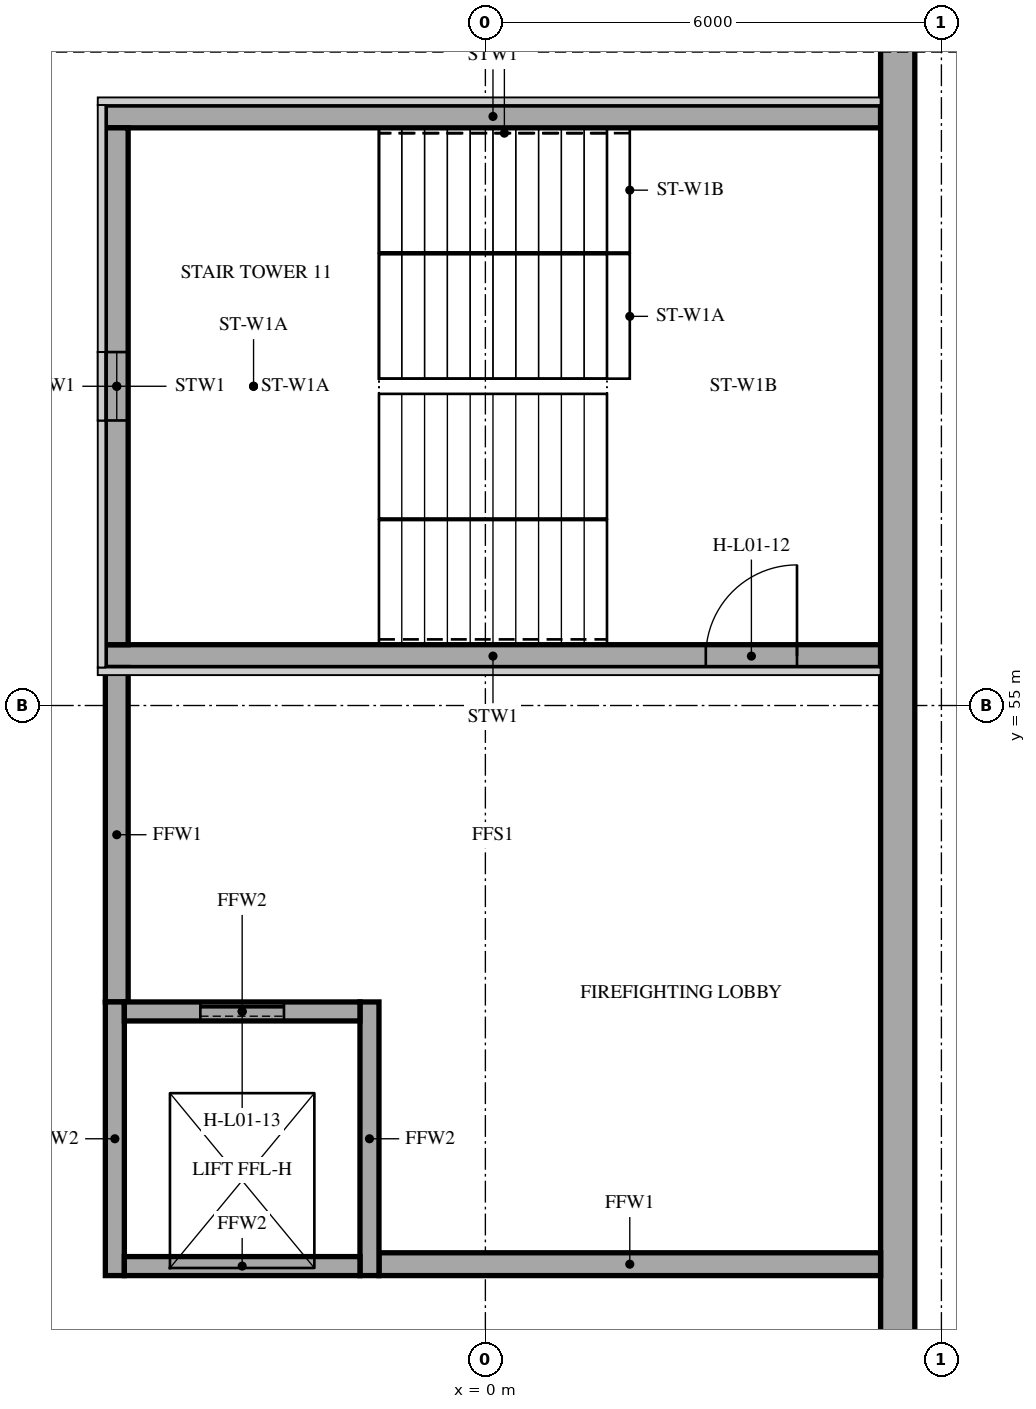
"""IFC4 building model, lengths in metres.
Left out: names, types, materials, properties, quantities, classifications, styles, units other than length and angle.
Written with IfcOpenShell. Run it as: python <this file> out.ifc"""

import sys

from ifc_helpers import new_model, si_unit, direction, frame, frame_2d, origin, place, context, subcontext, project, spatial, rectangle, extrude, element, fill, save


model = new_model("IFC4")
c1 = context("Model", 3, precision=1e-05, world=origin(), true_north=direction((0.0, 1.0)))
c2 = subcontext(c1, "Body", "Model", "MODEL_VIEW")
j1 = project(units=[si_unit("LENGTHUNIT", "METRE"), si_unit("PLANEANGLEUNIT", "RADIAN")], contexts=[c1])
p1 = place(None, origin())
s1 = spatial("IfcSite", under=j1, at=p1, CompositionType="ELEMENT")
p2 = place(p1, origin())
s2 = spatial("IfcBuilding", under=s1, at=p2, CompositionType="ELEMENT")
p3 = place(p2, frame((0.0, 0.0, 5.0)))
s3 = spatial("IfcBuildingStorey", under=s2, at=p3, CompositionType="ELEMENT", Elevation=5.0)
p4 = place(p3, frame((5.2, 55.65, 0.0), z_axis=(0.0, 0.0, 1.0), x_axis=(-1.0, 0.0, 0.0)))
e1 = element("IfcWall", 1, at=p4, inside=s3, PredefinedType="SHEAR", context=c2, shape_type="SweptSolid", body=[
    extrude(rectangle(XDim=10.2, YDim=0.3, at=frame_2d((5.1, 0.0))), origin(), (0.0, 0.0, 1.0), 5.0),
])
p5 = place(p4, frame((1.1, 0.0, 0.0)))
e2 = element("IfcOpeningElement", 2, at=p5, cuts=e1, PredefinedType="OPENING", context=c2, shape_type="SweptSolid", body=[
    extrude(rectangle(XDim=1.2, YDim=2.1, at=frame_2d((0.6, 1.05))), frame((0.0, 0.16, 0.0), z_axis=(0.0, -1.0, 0.0), x_axis=(1.0, 0.0, 0.0)), (0.0, 0.0, 1.0), 0.32),
])
p6 = place(p3, frame((5.2, 62.75, 0.0), z_axis=(0.0, 0.0, 1.0), x_axis=(-1.0, 0.0, 0.0)))
e3 = element("IfcWall", 3, at=p6, inside=s3, PredefinedType="SHEAR", context=c2, shape_type="SweptSolid", body=[
    extrude(rectangle(XDim=10.2, YDim=0.3, at=frame_2d((5.1, 0.0))), origin(), (0.0, 0.0, 1.0), 5.0),
])
p7 = place(p3, frame((-4.85, 55.8, 0.0), z_axis=(0.0, 0.0, 1.0), x_axis=(0.0, 1.0, 0.0)))
e4 = element("IfcWall", 4, at=p7, inside=s3, PredefinedType="SHEAR", context=c2, shape_type="SweptSolid", body=[
    extrude(rectangle(XDim=6.8, YDim=0.3, at=frame_2d((3.4, 0.0))), origin(), (0.0, 0.0, 1.0), 5.0),
])
p8 = place(p7, frame((2.95, 0.0, 2.67)))
e5 = element("IfcOpeningElement", 5, at=p8, cuts=e4, PredefinedType="OPENING", context=c2, shape_type="SweptSolid", body=[
    extrude(rectangle(XDim=0.9, YDim=1.5, at=frame_2d((0.45, 0.75))), frame((0.0, 0.16, 0.0), z_axis=(0.0, -1.0, 0.0), x_axis=(1.0, 0.0, 0.0)), (0.0, 0.0, 1.0), 0.32),
])
p9 = place(p3, frame((5.425, 46.75, 0.0), z_axis=(0.0, 0.0, 1.0), x_axis=(0.0, 1.0, 0.0)))
e6 = element("IfcWall", 6, at=p9, inside=s3, PredefinedType="SOLIDWALL", context=c2, shape_type="SweptSolid", body=[
    extrude(rectangle(XDim=61.65, YDim=0.45, at=frame_2d((30.825, 0.0))), origin(), (0.0, 0.0, 1.0), 5.0),
])
p10 = place(p3, frame((-4.85, 51.1, 0.0), z_axis=(0.0, 0.0, 1.0), x_axis=(0.0, 1.0, 0.0)))
e7 = element("IfcWall", 7, at=p10, inside=s3, PredefinedType="SHEAR", context=c2, shape_type="SweptSolid", body=[
    extrude(rectangle(XDim=4.4, YDim=0.3, at=frame_2d((2.2, 0.0))), origin(), (0.0, 0.0, 1.0), 4.75),
])
p11 = place(p3, frame((-1.4, 47.65, 0.0), z_axis=(0.0, 0.0, 1.0), x_axis=(1.0, 0.0, 0.0)))
e8 = element("IfcWall", 8, at=p11, inside=s3, PredefinedType="SHEAR", context=c2, shape_type="SweptSolid", body=[
    extrude(rectangle(XDim=6.6, YDim=0.3, at=frame_2d((3.3, 0.0))), origin(), (0.0, 0.0, 1.0), 4.75),
])
for number, where, z_axis, x_axis in (
    (9, (-4.875, 47.5, 0.0), (0.0, 0.0, 1.0), (0.0, 1.0, 0.0)),
    (10, (-1.525, 47.5, 0.0), (0.0, 0.0, 1.0), (0.0, 1.0, 0.0)),
):
    element("IfcWall", number, at=place(p3, frame(where, z_axis=z_axis, x_axis=x_axis)), inside=s3, PredefinedType="SHEAR", context=c2, shape_type="SweptSolid", body=[
        extrude(rectangle(XDim=3.6, YDim=0.25, at=frame_2d((1.8, 0.0))), origin(), (0.0, 0.0, 1.0), 5.0),
    ])
p12 = place(p3, frame((-4.75, 50.975, 0.0), z_axis=(0.0, 0.0, 1.0), x_axis=(1.0, 0.0, 0.0)))
e11 = element("IfcWall", 11, at=p12, inside=s3, PredefinedType="SHEAR", context=c2, shape_type="SweptSolid", body=[
    extrude(rectangle(XDim=3.1, YDim=0.25, at=frame_2d((1.55, 0.0))), origin(), (0.0, 0.0, 1.0), 5.0),
])
p13 = place(p12, frame((1.0, 0.0, 0.0)))
e12 = element("IfcOpeningElement", 12, at=p13, cuts=e11, PredefinedType="OPENING", context=c2, shape_type="SweptSolid", body=[
    extrude(rectangle(XDim=1.1, YDim=2.1, at=frame_2d((0.55, 1.05))), frame((0.0, 0.135, 0.0), z_axis=(0.0, -1.0, 0.0), x_axis=(1.0, 0.0, 0.0)), (0.0, 0.0, 1.0), 0.27),
])
p14 = place(p3, frame((-4.75, 47.625, 0.0), z_axis=(0.0, 0.0, 1.0), x_axis=(1.0, 0.0, 0.0)))
e13 = element("IfcWall", 13, at=p14, inside=s3, PredefinedType="SHEAR", context=c2, shape_type="SweptSolid", body=[
    extrude(rectangle(XDim=3.1, YDim=0.25, at=frame_2d((1.55, 0.0))), origin(), (0.0, 0.0, 1.0), 5.0),
])
p15 = place(p8, origin())
e14 = element("IfcWindow", 14, at=p15, inside=s3, PartitioningType="SINGLE_PANEL", PredefinedType="WINDOW", context=c2, shape_type="SweptSolid", body=[
    extrude(rectangle(XDim=0.9, YDim=1.5, at=frame_2d((0.45, 0.75))), frame((0.0, 0.03, 0.0), z_axis=(0.0, -1.0, 0.0), x_axis=(1.0, 0.0, 0.0)), (0.0, 0.0, 1.0), 0.06),
])
fill(e5, e14)
p16 = place(p5, frame((1.2, 0.0, 0.0), z_axis=(0.0, 0.0, 1.0), x_axis=(-1.0, 0.0, 0.0)))
e15 = element("IfcDoor", 15, at=p16, inside=s3, OperationType="SINGLE_SWING_RIGHT", PredefinedType="DOOR", context=c2, shape_type="SweptSolid", body=[
    extrude(rectangle(XDim=1.2, YDim=2.1, at=frame_2d((0.6, 1.05))), frame((0.0, 0.025, 0.0), z_axis=(0.0, -1.0, 0.0), x_axis=(1.0, 0.0, 0.0)), (0.0, 0.0, 1.0), 0.05),
])
fill(e2, e15)
p17 = place(p13, origin())
e16 = element("IfcDoor", 16, at=p17, inside=s3, OperationType="SLIDING_TO_LEFT", PredefinedType="DOOR", context=c2, shape_type="SweptSolid", body=[
    extrude(rectangle(XDim=1.1, YDim=2.1, at=frame_2d((0.55, 1.05))), frame((0.0, 0.025, 0.0), z_axis=(0.0, -1.0, 0.0), x_axis=(1.0, 0.0, 0.0)), (0.0, 0.0, 1.0), 0.05),
])
fill(e12, e16)
save(model, sys.argv[1])
